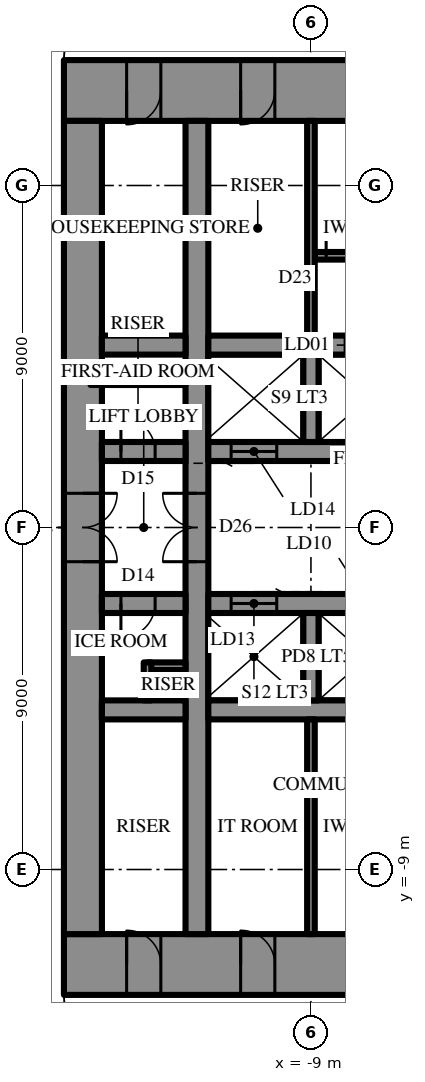
"""IFC4 building model, lengths in metres.
Left out: names, types, materials, properties, quantities, classifications, styles, units other than length and angle.
Written with IfcOpenShell. Run it as: python <this file> out.ifc"""

import sys

from ifc_helpers import new_model, si_unit, direction, frame, frame_2d, origin, place, context, subcontext, project, spatial, rectangle, extrude, element, fill, save


model = new_model("IFC4")
c1 = context("Model", 3, precision=1e-05, world=origin(), true_north=direction((0.0, 1.0)))
c2 = subcontext(c1, "Body", "Model", "MODEL_VIEW")
j1 = project(units=[si_unit("LENGTHUNIT", "METRE"), si_unit("PLANEANGLEUNIT", "RADIAN")], contexts=[c1])
p1 = place(None, origin())
s1 = spatial("IfcSite", under=j1, at=p1, CompositionType="ELEMENT")
p2 = place(p1, origin())
s2 = spatial("IfcBuilding", under=s1, at=p2, CompositionType="ELEMENT")
p3 = place(p2, frame((0.0, 0.0, 306.5)))
s3 = spatial("IfcBuildingStorey", under=s2, at=p3, CompositionType="ELEMENT", Elevation=306.5)
p4 = place(p3, frame((-15.5, 11.5, 0.0), z_axis=(0.0, 0.0, 1.0), x_axis=(1.0, 0.0, 0.0)))
e1 = element("IfcWall", 1, at=p4, inside=s3, PredefinedType="SHEAR", context=c2, shape_type="SweptSolid", body=[
    extrude(rectangle(XDim=31.0, YDim=1.6, at=frame_2d((15.5, 0.0))), origin(), (0.0, 0.0, 1.0), 5.0),
])
p5 = place(p4, frame((16.35, 0.0, 0.0)))
e2 = element("IfcOpeningElement", 2, at=p5, cuts=e1, PredefinedType="OPENING", context=c2, shape_type="SweptSolid", body=[
    extrude(rectangle(XDim=0.9, YDim=2.2, at=frame_2d((0.45, 1.1))), frame((0.0, 0.81, 0.0), z_axis=(0.0, -1.0, 0.0), x_axis=(1.0, 0.0, 0.0)), (0.0, 0.0, 1.0), 1.62),
])
p6 = place(p4, frame((19.35, 0.0, 0.0)))
e3 = element("IfcOpeningElement", 3, at=p6, cuts=e1, PredefinedType="OPENING", context=c2, shape_type="SweptSolid", body=[
    extrude(rectangle(XDim=0.9, YDim=2.2, at=frame_2d((0.45, 1.1))), frame((0.0, 0.81, 0.0), z_axis=(0.0, -1.0, 0.0), x_axis=(1.0, 0.0, 0.0)), (0.0, 0.0, 1.0), 1.62),
])
p7 = place(p4, frame((22.4, 0.0, 0.0)))
e4 = element("IfcOpeningElement", 4, at=p7, cuts=e1, PredefinedType="OPENING", context=c2, shape_type="SweptSolid", body=[
    extrude(rectangle(XDim=1.0, YDim=2.2, at=frame_2d((0.5, 1.1))), frame((0.0, 0.81, 0.0), z_axis=(0.0, -1.0, 0.0), x_axis=(1.0, 0.0, 0.0)), (0.0, 0.0, 1.0), 1.62),
])
p8 = place(p4, frame((1.65, 0.0, 0.0)))
e5 = element("IfcOpeningElement", 5, at=p8, cuts=e1, PredefinedType="OPENING", context=c2, shape_type="SweptSolid", body=[
    extrude(rectangle(XDim=0.9, YDim=2.2, at=frame_2d((0.45, 1.1))), frame((0.0, 0.81, 0.0), z_axis=(0.0, -1.0, 0.0), x_axis=(1.0, 0.0, 0.0)), (0.0, 0.0, 1.0), 1.62),
])
p9 = place(p4, frame((4.65, 0.0, 0.0)))
e6 = element("IfcOpeningElement", 6, at=p9, cuts=e1, PredefinedType="OPENING", context=c2, shape_type="SweptSolid", body=[
    extrude(rectangle(XDim=0.9, YDim=2.2, at=frame_2d((0.45, 1.1))), frame((0.0, 0.81, 0.0), z_axis=(0.0, -1.0, 0.0), x_axis=(1.0, 0.0, 0.0)), (0.0, 0.0, 1.0), 1.62),
])
p10 = place(p4, frame((25.45, 0.0, 0.0)))
e7 = element("IfcOpeningElement", 7, at=p10, cuts=e1, PredefinedType="OPENING", context=c2, shape_type="SweptSolid", body=[
    extrude(rectangle(XDim=0.9, YDim=2.2, at=frame_2d((0.45, 1.1))), frame((0.0, 0.81, 0.0), z_axis=(0.0, -1.0, 0.0), x_axis=(1.0, 0.0, 0.0)), (0.0, 0.0, 1.0), 1.62),
])
p11 = place(p4, frame((28.45, 0.0, 0.0)))
e8 = element("IfcOpeningElement", 8, at=p11, cuts=e1, PredefinedType="OPENING", context=c2, shape_type="SweptSolid", body=[
    extrude(rectangle(XDim=0.9, YDim=2.2, at=frame_2d((0.45, 1.1))), frame((0.0, 0.81, 0.0), z_axis=(0.0, -1.0, 0.0), x_axis=(1.0, 0.0, 0.0)), (0.0, 0.0, 1.0), 1.62),
])
p12 = place(p3, frame((15.5, -11.5, 0.0), z_axis=(0.0, 0.0, 1.0), x_axis=(-1.0, 0.0, 0.0)))
e9 = element("IfcWall", 9, at=p12, inside=s3, PredefinedType="SHEAR", context=c2, shape_type="SweptSolid", body=[
    extrude(rectangle(XDim=31.0, YDim=1.6, at=frame_2d((15.5, 0.0))), origin(), (0.0, 0.0, 1.0), 5.0),
])
p13 = place(p12, frame((16.35, 0.0, 0.0)))
e10 = element("IfcOpeningElement", 10, at=p13, cuts=e9, PredefinedType="OPENING", context=c2, shape_type="SweptSolid", body=[
    extrude(rectangle(XDim=0.9, YDim=2.2, at=frame_2d((0.45, 1.1))), frame((0.0, 0.81, 0.0), z_axis=(0.0, -1.0, 0.0), x_axis=(1.0, 0.0, 0.0)), (0.0, 0.0, 1.0), 1.62),
])
p14 = place(p12, frame((19.35, 0.0, 0.0)))
e11 = element("IfcOpeningElement", 11, at=p14, cuts=e9, PredefinedType="OPENING", context=c2, shape_type="SweptSolid", body=[
    extrude(rectangle(XDim=0.9, YDim=2.2, at=frame_2d((0.45, 1.1))), frame((0.0, 0.81, 0.0), z_axis=(0.0, -1.0, 0.0), x_axis=(1.0, 0.0, 0.0)), (0.0, 0.0, 1.0), 1.62),
])
p15 = place(p12, frame((22.4, 0.0, 0.0)))
e12 = element("IfcOpeningElement", 12, at=p15, cuts=e9, PredefinedType="OPENING", context=c2, shape_type="SweptSolid", body=[
    extrude(rectangle(XDim=1.0, YDim=2.2, at=frame_2d((0.5, 1.1))), frame((0.0, 0.81, 0.0), z_axis=(0.0, -1.0, 0.0), x_axis=(1.0, 0.0, 0.0)), (0.0, 0.0, 1.0), 1.62),
])
p16 = place(p12, frame((1.65, 0.0, 0.0)))
e13 = element("IfcOpeningElement", 13, at=p16, cuts=e9, PredefinedType="OPENING", context=c2, shape_type="SweptSolid", body=[
    extrude(rectangle(XDim=0.9, YDim=2.2, at=frame_2d((0.45, 1.1))), frame((0.0, 0.81, 0.0), z_axis=(0.0, -1.0, 0.0), x_axis=(1.0, 0.0, 0.0)), (0.0, 0.0, 1.0), 1.62),
])
p17 = place(p12, frame((4.65, 0.0, 0.0)))
e14 = element("IfcOpeningElement", 14, at=p17, cuts=e9, PredefinedType="OPENING", context=c2, shape_type="SweptSolid", body=[
    extrude(rectangle(XDim=0.9, YDim=2.2, at=frame_2d((0.45, 1.1))), frame((0.0, 0.81, 0.0), z_axis=(0.0, -1.0, 0.0), x_axis=(1.0, 0.0, 0.0)), (0.0, 0.0, 1.0), 1.62),
])
p18 = place(p12, frame((25.45, 0.0, 0.0)))
e15 = element("IfcOpeningElement", 15, at=p18, cuts=e9, PredefinedType="OPENING", context=c2, shape_type="SweptSolid", body=[
    extrude(rectangle(XDim=0.9, YDim=2.2, at=frame_2d((0.45, 1.1))), frame((0.0, 0.81, 0.0), z_axis=(0.0, -1.0, 0.0), x_axis=(1.0, 0.0, 0.0)), (0.0, 0.0, 1.0), 1.62),
])
p19 = place(p12, frame((28.45, 0.0, 0.0)))
e16 = element("IfcOpeningElement", 16, at=p19, cuts=e9, PredefinedType="OPENING", context=c2, shape_type="SweptSolid", body=[
    extrude(rectangle(XDim=0.9, YDim=2.2, at=frame_2d((0.45, 1.1))), frame((0.0, 0.81, 0.0), z_axis=(0.0, -1.0, 0.0), x_axis=(1.0, 0.0, 0.0)), (0.0, 0.0, 1.0), 1.62),
])
p20 = place(p3, frame((-15.0, 10.7, 0.0), z_axis=(0.0, 0.0, 1.0), x_axis=(0.0, -1.0, 0.0)))
e17 = element("IfcWall", 17, at=p20, inside=s3, PredefinedType="SHEAR", context=c2, shape_type="SweptSolid", body=[
    extrude(rectangle(XDim=21.4, YDim=1.0, at=frame_2d((10.7, 0.0))), origin(), (0.0, 0.0, 1.0), 5.0),
])
p21 = place(p20, frame((9.8, 0.0, 0.0)))
e18 = element("IfcOpeningElement", 18, at=p21, cuts=e17, PredefinedType="OPENING", context=c2, shape_type="SweptSolid", body=[
    extrude(rectangle(XDim=1.8, YDim=2.4, at=frame_2d((0.9, 1.2))), frame((0.0, 0.51, 0.0), z_axis=(0.0, -1.0, 0.0), x_axis=(1.0, 0.0, 0.0)), (0.0, 0.0, 1.0), 1.02),
])
p22 = place(p3, frame((-12.0, -10.7, 0.0), z_axis=(0.0, 0.0, 1.0), x_axis=(0.0, 1.0, 0.0)))
e19 = element("IfcWall", 19, at=p22, inside=s3, PredefinedType="SHEAR", context=c2, shape_type="SweptSolid", body=[
    extrude(rectangle(XDim=21.4, YDim=0.6, at=frame_2d((10.7, 0.0))), origin(), (0.0, 0.0, 1.0), 5.0),
])
p23 = place(p22, frame((9.8, 0.0, 0.0)))
e20 = element("IfcOpeningElement", 20, at=p23, cuts=e19, PredefinedType="OPENING", context=c2, shape_type="SweptSolid", body=[
    extrude(rectangle(XDim=1.8, YDim=2.4, at=frame_2d((0.9, 1.2))), frame((0.0, 0.31, 0.0), z_axis=(0.0, -1.0, 0.0), x_axis=(1.0, 0.0, 0.0)), (0.0, 0.0, 1.0), 0.62),
])
p24 = place(p3, frame((-14.5, 2.0, 0.0), z_axis=(0.0, 0.0, 1.0), x_axis=(1.0, 0.0, 0.0)))
e21 = element("IfcWall", 21, at=p24, inside=s3, PredefinedType="SHEAR", context=c2, shape_type="SweptSolid", body=[
    extrude(rectangle(XDim=2.2, YDim=0.5, at=frame_2d((1.1, 0.0))), origin(), (0.0, 0.0, 1.0), 5.0),
])
p25 = place(p24, frame((0.5, 0.0, 0.0)))
e22 = element("IfcOpeningElement", 22, at=p25, cuts=e21, PredefinedType="OPENING", context=c2, shape_type="SweptSolid", body=[
    extrude(rectangle(XDim=0.9, YDim=2.2, at=frame_2d((0.45, 1.1))), frame((0.0, 0.26, 0.0), z_axis=(0.0, -1.0, 0.0), x_axis=(1.0, 0.0, 0.0)), (0.0, 0.0, 1.0), 0.52),
])
p26 = place(p3, frame((-11.7, 2.0, 0.0), z_axis=(0.0, 0.0, 1.0), x_axis=(1.0, 0.0, 0.0)))
e23 = element("IfcWall", 23, at=p26, inside=s3, PredefinedType="SHEAR", context=c2, shape_type="SweptSolid", body=[
    extrude(rectangle(XDim=5.9, YDim=0.5, at=frame_2d((2.95, 0.0))), origin(), (0.0, 0.0, 1.0), 5.0),
])
p27 = place(p26, frame((0.6, 0.0, 0.0)))
e24 = element("IfcOpeningElement", 24, at=p27, cuts=e23, PredefinedType="OPENING", context=c2, shape_type="SweptSolid", body=[
    extrude(rectangle(XDim=1.2, YDim=2.2, at=frame_2d((0.6, 1.1))), frame((0.0, 0.26, 0.0), z_axis=(0.0, -1.0, 0.0), x_axis=(1.0, 0.0, 0.0)), (0.0, 0.0, 1.0), 0.52),
])
p28 = place(p3, frame((-14.5, 4.8, 0.0), z_axis=(0.0, 0.0, 1.0), x_axis=(1.0, 0.0, 0.0)))
e25 = element("IfcWall", 25, at=p28, inside=s3, PredefinedType="SHEAR", context=c2, shape_type="SweptSolid", body=[
    extrude(rectangle(XDim=2.2, YDim=0.5, at=frame_2d((1.1, 0.0))), origin(), (0.0, 0.0, 1.0), 5.0),
])
p29 = place(p3, frame((-11.7, 4.8, 0.0), z_axis=(0.0, 0.0, 1.0), x_axis=(1.0, 0.0, 0.0)))
e26 = element("IfcWall", 26, at=p29, inside=s3, PredefinedType="SHEAR", context=c2, shape_type="SweptSolid", body=[
    extrude(rectangle(XDim=23.4, YDim=0.5, at=frame_2d((11.7, 0.0))), origin(), (0.0, 0.0, 1.0), 5.0),
])
p30 = place(p29, frame((6.6, 0.0, 0.0)))
e27 = element("IfcOpeningElement", 27, at=p30, cuts=e26, PredefinedType="OPENING", context=c2, shape_type="SweptSolid", body=[
    extrude(rectangle(XDim=1.2, YDim=2.2, at=frame_2d((0.6, 1.1))), frame((0.0, 0.26, 0.0), z_axis=(0.0, -1.0, 0.0), x_axis=(1.0, 0.0, 0.0)), (0.0, 0.0, 1.0), 0.52),
])
p31 = place(p29, frame((3.6, 0.0, 0.0)))
e28 = element("IfcOpeningElement", 28, at=p31, cuts=e26, PredefinedType="OPENING", context=c2, shape_type="SweptSolid", body=[
    extrude(rectangle(XDim=1.2, YDim=2.2, at=frame_2d((0.6, 1.1))), frame((0.0, 0.26, 0.0), z_axis=(0.0, -1.0, 0.0), x_axis=(1.0, 0.0, 0.0)), (0.0, 0.0, 1.0), 0.52),
])
p32 = place(p3, frame((-9.0, 2.25, 0.0), z_axis=(0.0, 0.0, 1.0), x_axis=(0.0, 1.0, 0.0)))
e29 = element("IfcWall", 29, at=p32, inside=s3, PredefinedType="SHEAR", context=c2, shape_type="SweptSolid", body=[
    extrude(rectangle(XDim=2.3, YDim=0.4, at=frame_2d((1.15, 0.0))), origin(), (0.0, 0.0, 1.0), 5.0),
])
p33 = place(p3, frame((-8.9, 7.15, 0.0), z_axis=(0.0, 0.0, 1.0), x_axis=(1.0, 0.0, 0.0)))
e30 = element("IfcWall", 30, at=p33, inside=s3, PredefinedType="SHEAR", context=c2, shape_type="SweptSolid", body=[
    extrude(rectangle(XDim=8.6, YDim=0.2, at=frame_2d((4.3, 0.0))), origin(), (0.0, 0.0, 1.0), 5.0),
])
p34 = place(p33, frame((0.3, 0.0, 0.0)))
e31 = element("IfcOpeningElement", 31, at=p34, cuts=e30, PredefinedType="OPENING", context=c2, shape_type="SweptSolid", body=[
    extrude(rectangle(XDim=1.0, YDim=2.2, at=frame_2d((0.5, 1.1))), frame((0.0, 0.11, 0.0), z_axis=(0.0, -1.0, 0.0), x_axis=(1.0, 0.0, 0.0)), (0.0, 0.0, 1.0), 0.22),
])
p35 = place(p3, frame((3.2, -2.0, 0.0), z_axis=(0.0, 0.0, 1.0), x_axis=(-1.0, 0.0, 0.0)))
e32 = element("IfcWall", 32, at=p35, inside=s3, PredefinedType="SHEAR", context=c2, shape_type="SweptSolid", body=[
    extrude(rectangle(XDim=14.9, YDim=0.5, at=frame_2d((7.45, 0.0))), origin(), (0.0, 0.0, 1.0), 5.0),
])
p36 = place(p35, frame((1.15, 0.0, 0.0)))
e33 = element("IfcOpeningElement", 33, at=p36, cuts=e32, PredefinedType="OPENING", context=c2, shape_type="SweptSolid", body=[
    extrude(rectangle(XDim=1.1, YDim=2.2, at=frame_2d((0.55, 1.1))), frame((0.0, 0.26, 0.0), z_axis=(0.0, -1.0, 0.0), x_axis=(1.0, 0.0, 0.0)), (0.0, 0.0, 1.0), 0.52),
])
p37 = place(p35, frame((4.15, 0.0, 0.0)))
e34 = element("IfcOpeningElement", 34, at=p37, cuts=e32, PredefinedType="OPENING", context=c2, shape_type="SweptSolid", body=[
    extrude(rectangle(XDim=1.1, YDim=2.2, at=frame_2d((0.55, 1.1))), frame((0.0, 0.26, 0.0), z_axis=(0.0, -1.0, 0.0), x_axis=(1.0, 0.0, 0.0)), (0.0, 0.0, 1.0), 0.52),
])
p38 = place(p35, frame((7.15, 0.0, 0.0)))
e35 = element("IfcOpeningElement", 35, at=p38, cuts=e32, PredefinedType="OPENING", context=c2, shape_type="SweptSolid", body=[
    extrude(rectangle(XDim=1.1, YDim=2.2, at=frame_2d((0.55, 1.1))), frame((0.0, 0.26, 0.0), z_axis=(0.0, -1.0, 0.0), x_axis=(1.0, 0.0, 0.0)), (0.0, 0.0, 1.0), 0.52),
])
p39 = place(p35, frame((10.15, 0.0, 0.0)))
e36 = element("IfcOpeningElement", 36, at=p39, cuts=e32, PredefinedType="OPENING", context=c2, shape_type="SweptSolid", body=[
    extrude(rectangle(XDim=1.1, YDim=2.2, at=frame_2d((0.55, 1.1))), frame((0.0, 0.26, 0.0), z_axis=(0.0, -1.0, 0.0), x_axis=(1.0, 0.0, 0.0)), (0.0, 0.0, 1.0), 0.52),
])
p40 = place(p35, frame((13.1, 0.0, 0.0)))
e37 = element("IfcOpeningElement", 37, at=p40, cuts=e32, PredefinedType="OPENING", context=c2, shape_type="SweptSolid", body=[
    extrude(rectangle(XDim=1.2, YDim=2.2, at=frame_2d((0.6, 1.1))), frame((0.0, 0.26, 0.0), z_axis=(0.0, -1.0, 0.0), x_axis=(1.0, 0.0, 0.0)), (0.0, 0.0, 1.0), 0.52),
])
p41 = place(p3, frame((-12.3, -2.0, 0.0), z_axis=(0.0, 0.0, 1.0), x_axis=(-1.0, 0.0, 0.0)))
e38 = element("IfcWall", 38, at=p41, inside=s3, PredefinedType="SHEAR", context=c2, shape_type="SweptSolid", body=[
    extrude(rectangle(XDim=2.2, YDim=0.5, at=frame_2d((1.1, 0.0))), origin(), (0.0, 0.0, 1.0), 5.0),
])
p42 = place(p41, frame((0.8, 0.0, 0.0)))
e39 = element("IfcOpeningElement", 39, at=p42, cuts=e38, PredefinedType="OPENING", context=c2, shape_type="SweptSolid", body=[
    extrude(rectangle(XDim=0.9, YDim=2.2, at=frame_2d((0.45, 1.1))), frame((0.0, 0.26, 0.0), z_axis=(0.0, -1.0, 0.0), x_axis=(1.0, 0.0, 0.0)), (0.0, 0.0, 1.0), 0.52),
])
p43 = place(p3, frame((11.7, -4.8, 0.0), z_axis=(0.0, 0.0, 1.0), x_axis=(-1.0, 0.0, 0.0)))
e40 = element("IfcWall", 40, at=p43, inside=s3, PredefinedType="SHEAR", context=c2, shape_type="SweptSolid", body=[
    extrude(rectangle(XDim=23.4, YDim=0.5, at=frame_2d((11.7, 0.0))), origin(), (0.0, 0.0, 1.0), 5.0),
])
p44 = place(p43, frame((6.6, 0.0, 0.0)))
e41 = element("IfcOpeningElement", 41, at=p44, cuts=e40, PredefinedType="OPENING", context=c2, shape_type="SweptSolid", body=[
    extrude(rectangle(XDim=1.2, YDim=2.2, at=frame_2d((0.6, 1.1))), frame((0.0, 0.26, 0.0), z_axis=(0.0, -1.0, 0.0), x_axis=(1.0, 0.0, 0.0)), (0.0, 0.0, 1.0), 0.52),
])
p45 = place(p43, frame((3.6, 0.0, 0.0)))
e42 = element("IfcOpeningElement", 42, at=p45, cuts=e40, PredefinedType="OPENING", context=c2, shape_type="SweptSolid", body=[
    extrude(rectangle(XDim=1.2, YDim=2.2, at=frame_2d((0.6, 1.1))), frame((0.0, 0.26, 0.0), z_axis=(0.0, -1.0, 0.0), x_axis=(1.0, 0.0, 0.0)), (0.0, 0.0, 1.0), 0.52),
])
p46 = place(p3, frame((-12.3, -4.8, 0.0), z_axis=(0.0, 0.0, 1.0), x_axis=(-1.0, 0.0, 0.0)))
e43 = element("IfcWall", 43, at=p46, inside=s3, PredefinedType="SHEAR", context=c2, shape_type="SweptSolid", body=[
    extrude(rectangle(XDim=2.2, YDim=0.5, at=frame_2d((1.1, 0.0))), origin(), (0.0, 0.0, 1.0), 5.0),
])
p47 = place(p3, frame((-9.0, -2.25, 0.0), z_axis=(0.0, 0.0, 1.0), x_axis=(0.0, -1.0, 0.0)))
e44 = element("IfcWall", 44, at=p47, inside=s3, PredefinedType="SHEAR", context=c2, shape_type="SweptSolid", body=[
    extrude(rectangle(XDim=2.3, YDim=0.4, at=frame_2d((1.15, 0.0))), origin(), (0.0, 0.0, 1.0), 5.0),
])
for number, where, z_axis, x_axis in (
    (45, (-9.0, 5.05, 0.0), (0.0, 0.0, 1.0), (0.0, 1.0, 0.0)),
    (46, (-9.0, -5.05, 0.0), (0.0, 0.0, 1.0), (0.0, -1.0, 0.0)),
):
    element("IfcWall", number, at=place(p3, frame(where, z_axis=z_axis, x_axis=x_axis)), inside=s3, PredefinedType="PARTITIONING", context=c2, shape_type="SweptSolid", body=[
        extrude(rectangle(XDim=5.65, YDim=0.2, at=frame_2d((2.825, 0.0))), origin(), (0.0, 0.0, 1.0), 4.8),
    ])
p48 = place(p3, frame((-14.8, 3.85, 0.0), z_axis=(0.0, 0.0, 1.0), x_axis=(1.0, 0.0, 0.0)))
e47 = element("IfcWall", 47, at=p48, inside=s3, PredefinedType="PARTITIONING", context=c2, shape_type="SweptSolid", body=[
    extrude(rectangle(XDim=2.5, YDim=0.2, at=frame_2d((1.25, 0.0))), origin(), (0.0, 0.0, 1.0), 4.8),
])
for number, where, z_axis, x_axis in (
    (48, (-12.3, -3.65, 0.0), (0.0, 0.0, 1.0), (-1.0, 0.0, 0.0)),
    (49, (-13.3, -3.55, 0.0), (0.0, 0.0, 1.0), (0.0, -1.0, 0.0)),
):
    element("IfcWall", number, at=place(p3, frame(where, z_axis=z_axis, x_axis=x_axis)), inside=s3, PredefinedType="PARTITIONING", context=c2, shape_type="SweptSolid", body=[
        extrude(rectangle(XDim=1.0, YDim=0.2, at=frame_2d((0.5, 0.0))), origin(), (0.0, 0.0, 1.0), 4.8),
    ])
p49 = place(p21, origin())
e50 = element("IfcDoor", 50, at=p49, inside=s3, OperationType="DOUBLE_DOOR_SINGLE_SWING", PredefinedType="DOOR", context=c2, shape_type="SweptSolid", body=[
    extrude(rectangle(XDim=1.8, YDim=2.4, at=frame_2d((0.9, 1.2))), frame((0.0, 0.025, 0.0), z_axis=(0.0, -1.0, 0.0), x_axis=(1.0, 0.0, 0.0)), (0.0, 0.0, 1.0), 0.05),
])
fill(e18, e50)
p50 = place(p34, origin())
e51 = element("IfcDoor", 51, at=p50, inside=s3, OperationType="SINGLE_SWING_RIGHT", PredefinedType="DOOR", context=c2, shape_type="SweptSolid", body=[
    extrude(rectangle(XDim=1.0, YDim=2.2, at=frame_2d((0.5, 1.1))), frame((0.0, 0.025, 0.0), z_axis=(0.0, -1.0, 0.0), x_axis=(1.0, 0.0, 0.0)), (0.0, 0.0, 1.0), 0.05),
])
fill(e31, e51)
p51 = place(p8, frame((0.9, 0.0, 0.0), z_axis=(0.0, 0.0, 1.0), x_axis=(-1.0, 0.0, 0.0)))
e52 = element("IfcDoor", 52, at=p51, inside=s3, OperationType="SINGLE_SWING_LEFT", PredefinedType="DOOR", context=c2, shape_type="SweptSolid", body=[
    extrude(rectangle(XDim=0.9, YDim=2.2, at=frame_2d((0.45, 1.1))), frame((0.0, 0.025, 0.0), z_axis=(0.0, -1.0, 0.0), x_axis=(1.0, 0.0, 0.0)), (0.0, 0.0, 1.0), 0.05),
])
fill(e5, e52)
p52 = place(p9, frame((0.9, 0.0, 0.0), z_axis=(0.0, 0.0, 1.0), x_axis=(-1.0, 0.0, 0.0)))
e53 = element("IfcDoor", 53, at=p52, inside=s3, OperationType="SINGLE_SWING_LEFT", PredefinedType="DOOR", context=c2, shape_type="SweptSolid", body=[
    extrude(rectangle(XDim=0.9, YDim=2.2, at=frame_2d((0.45, 1.1))), frame((0.0, 0.025, 0.0), z_axis=(0.0, -1.0, 0.0), x_axis=(1.0, 0.0, 0.0)), (0.0, 0.0, 1.0), 0.05),
])
fill(e6, e53)
p53 = place(p18, frame((0.9, 0.0, 0.0), z_axis=(0.0, 0.0, 1.0), x_axis=(-1.0, 0.0, 0.0)))
e54 = element("IfcDoor", 54, at=p53, inside=s3, OperationType="SINGLE_SWING_RIGHT", PredefinedType="DOOR", context=c2, shape_type="SweptSolid", body=[
    extrude(rectangle(XDim=0.9, YDim=2.2, at=frame_2d((0.45, 1.1))), frame((0.0, 0.025, 0.0), z_axis=(0.0, -1.0, 0.0), x_axis=(1.0, 0.0, 0.0)), (0.0, 0.0, 1.0), 0.05),
])
fill(e15, e54)
p54 = place(p19, frame((0.9, 0.0, 0.0), z_axis=(0.0, 0.0, 1.0), x_axis=(-1.0, 0.0, 0.0)))
e55 = element("IfcDoor", 55, at=p54, inside=s3, OperationType="SINGLE_SWING_RIGHT", PredefinedType="DOOR", context=c2, shape_type="SweptSolid", body=[
    extrude(rectangle(XDim=0.9, YDim=2.2, at=frame_2d((0.45, 1.1))), frame((0.0, 0.025, 0.0), z_axis=(0.0, -1.0, 0.0), x_axis=(1.0, 0.0, 0.0)), (0.0, 0.0, 1.0), 0.05),
])
fill(e16, e55)
p55 = place(p25, origin())
e56 = element("IfcDoor", 56, at=p55, inside=s3, OperationType="SINGLE_SWING_RIGHT", PredefinedType="DOOR", context=c2, shape_type="SweptSolid", body=[
    extrude(rectangle(XDim=0.9, YDim=2.2, at=frame_2d((0.45, 1.1))), frame((0.0, 0.025, 0.0), z_axis=(0.0, -1.0, 0.0), x_axis=(1.0, 0.0, 0.0)), (0.0, 0.0, 1.0), 0.05),
])
fill(e22, e56)
p56 = place(p42, origin())
e57 = element("IfcDoor", 57, at=p56, inside=s3, OperationType="SINGLE_SWING_LEFT", PredefinedType="DOOR", context=c2, shape_type="SweptSolid", body=[
    extrude(rectangle(XDim=0.9, YDim=2.2, at=frame_2d((0.45, 1.1))), frame((0.0, 0.025, 0.0), z_axis=(0.0, -1.0, 0.0), x_axis=(1.0, 0.0, 0.0)), (0.0, 0.0, 1.0), 0.05),
])
fill(e39, e57)
p57 = place(p23, origin())
e58 = element("IfcDoor", 58, at=p57, inside=s3, OperationType="DOUBLE_DOOR_SINGLE_SWING", PredefinedType="DOOR", context=c2, shape_type="SweptSolid", body=[
    extrude(rectangle(XDim=1.8, YDim=2.4, at=frame_2d((0.9, 1.2))), frame((0.0, 0.025, 0.0), z_axis=(0.0, -1.0, 0.0), x_axis=(1.0, 0.0, 0.0)), (0.0, 0.0, 1.0), 0.05),
])
fill(e20, e58)
p58 = place(p27, frame((1.2, 0.0, 0.0), z_axis=(0.0, 0.0, 1.0), x_axis=(-1.0, 0.0, 0.0)))
e59 = element("IfcDoor", 59, at=p58, inside=s3, OperationType="SLIDING_TO_LEFT", PredefinedType="DOOR", context=c2, shape_type="SweptSolid", body=[
    extrude(rectangle(XDim=1.2, YDim=2.2, at=frame_2d((0.6, 1.1))), frame((0.0, 0.025, 0.0), z_axis=(0.0, -1.0, 0.0), x_axis=(1.0, 0.0, 0.0)), (0.0, 0.0, 1.0), 0.05),
])
fill(e24, e59)
p59 = place(p40, frame((1.2, 0.0, 0.0), z_axis=(0.0, 0.0, 1.0), x_axis=(-1.0, 0.0, 0.0)))
e60 = element("IfcDoor", 60, at=p59, inside=s3, OperationType="SLIDING_TO_LEFT", PredefinedType="DOOR", context=c2, shape_type="SweptSolid", body=[
    extrude(rectangle(XDim=1.2, YDim=2.2, at=frame_2d((0.6, 1.1))), frame((0.0, 0.025, 0.0), z_axis=(0.0, -1.0, 0.0), x_axis=(1.0, 0.0, 0.0)), (0.0, 0.0, 1.0), 0.05),
])
fill(e37, e60)
save(model, sys.argv[1])
